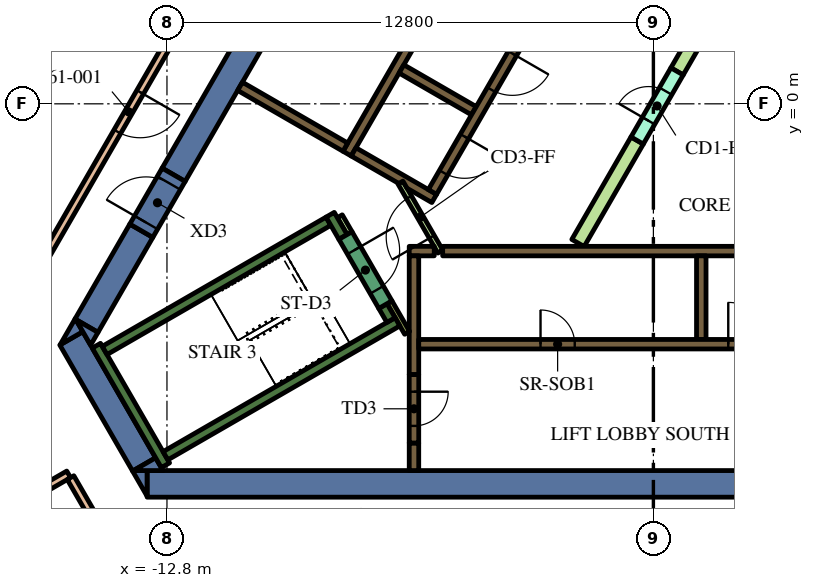
"""IFC4 building model, lengths in metres.
Left out: names, types, materials, properties, quantities, classifications, styles, units other than length and angle.
Written with IfcOpenShell. Run it as: python <this file> out.ifc"""

import sys

from ifc_helpers import new_model, si_unit, direction, frame, frame_2d, origin, place, context, subcontext, project, spatial, polyline, rectangle, outline, extrude, element, fill, save


model = new_model("IFC4")
c1 = context("Model", 3, precision=1e-05, world=origin(), true_north=direction((0.0, 1.0)))
c2 = subcontext(c1, "Body", "Model", "MODEL_VIEW")
j1 = project(units=[si_unit("LENGTHUNIT", "METRE"), si_unit("PLANEANGLEUNIT", "RADIAN")], contexts=[c1])
p1 = place(None, origin())
s1 = spatial("IfcSite", under=j1, at=p1, CompositionType="ELEMENT")
p2 = place(p1, origin())
s2 = spatial("IfcBuilding", under=s1, at=p2, CompositionType="ELEMENT")
p3 = place(p2, frame((0.0, 0.0, 261.6)))
s3 = spatial("IfcBuildingStorey", under=s2, at=p3, CompositionType="ELEMENT", Elevation=261.6)
p4 = place(p3, frame((8.904, -10.0, 0.0), z_axis=(0.0, 0.0, 1.0), x_axis=(-1.0, 0.0, 0.0)))
e1 = element("IfcWall", 1, at=p4, inside=s3, PredefinedType="SOLIDWALL", context=c2, shape_type="SweptSolid", body=[
    extrude(rectangle(XDim=22.226, YDim=0.7, at=frame_2d((11.113, 0.0))), origin(), (0.0, 0.0, 1.0), 5.4),
])
p5 = place(p3, origin())
e2 = element("IfcWall", 2, at=p5, inside=s3, PredefinedType="SOLIDWALL", context=c2, shape_type="SweptSolid", body=[
    extrude(outline(polyline([(-13.712, -9.65), (-13.324, -9.65), (-13.324, -10.322), (-13.712, -9.65)])), origin(), (0.0, 0.0, 1.0), 5.4),
])
p6 = place(p3, frame((-13.402, -9.487, 0.0), z_axis=(0.0, 0.0, 1.0), x_axis=(-0.500020498207, 0.866013568815, 0.0)))
e3 = element("IfcWall", 3, at=p6, inside=s3, PredefinedType="SOLIDWALL", context=c2, shape_type="SweptSolid", body=[
    extrude(rectangle(XDim=3.829, YDim=0.7, at=frame_2d((1.915, 0.0))), origin(), (0.0, 0.0, 1.0), 5.4),
])
e4 = element("IfcWall", 4, at=p5, inside=s3, PredefinedType="SOLIDWALL", context=c2, shape_type="SweptSolid", body=[
    extrude(outline(polyline([(-15.014, -5.995), (-15.611, -6.339), (-15.213, -5.65), (-15.014, -5.995)])), origin(), (0.0, 0.0, 1.0), 5.4),
])
e5 = element("IfcWall", 5, at=p5, inside=s3, PredefinedType="SOLIDWALL", context=c2, shape_type="SweptSolid", body=[
    extrude(outline(polyline([(-12.904, -9.65), (-13.68, -9.65), (-13.098, -9.314), (-12.904, -9.65)])), origin(), (0.0, 0.0, 1.0), 5.4),
])
p7 = place(p3, frame((-13.475, -3.339, 0.0), z_axis=(0.0, 0.0, 1.0), x_axis=(-0.500008214683, -0.866020660983, 0.0)))
e6 = element("IfcWall", 6, at=p7, inside=s3, PredefinedType="SOLIDWALL", context=c2, shape_type="SweptSolid", body=[
    extrude(rectangle(XDim=2.884, YDim=0.7, at=frame_2d((1.442, 0.0))), origin(), (0.0, 0.0, 1.0), 5.4),
])
e7 = element("IfcWall", 7, at=p5, inside=s3, PredefinedType="SOLIDWALL", context=c2, shape_type="SweptSolid", body=[
    extrude(outline(polyline([(-14.809, -6.35), (-15.197, -5.678), (-14.615, -6.014), (-14.809, -6.35)])), origin(), (0.0, 0.0, 1.0), 5.4),
])
p8 = place(p3, frame((-12.625, -1.867, 0.0), z_axis=(0.0, 0.0, 1.0), x_axis=(0.499996974394, 0.866027150612, 0.0)))
e8 = element("IfcWall", 8, at=p8, inside=s3, PredefinedType="SOLIDWALL", context=c2, shape_type="SweptSolid", body=[
    extrude(rectangle(XDim=15.858, YDim=0.7, at=frame_2d((7.929, 0.0))), origin(), (0.0, 0.0, 1.0), 5.4),
])
p9 = place(p3, frame((-12.84, -9.511, 0.0), z_axis=(0.0, 0.0, 1.0), x_axis=(-0.499997733992, 0.866026712061, 0.0)))
e9 = element("IfcWall", 9, at=p9, inside=s3, PredefinedType="SOLIDWALL", context=c2, shape_type="SweptSolid", body=[
    extrude(rectangle(XDim=3.634, YDim=0.25, at=frame_2d((1.817, 0.0))), origin(), (0.0, 0.0, 1.0), 5.4),
])
p10 = place(p3, frame((-14.44, -6.49, 0.0), z_axis=(0.0, 0.0, 1.0), x_axis=(0.866022966069, 0.500004222222, 0.0)))
e10 = element("IfcWall", 10, at=p10, inside=s3, PredefinedType="SOLIDWALL", context=c2, shape_type="SweptSolid", body=[
    extrude(rectangle(XDim=6.8, YDim=0.25, at=frame_2d((3.4, 0.0))), origin(), (0.0, 0.0, 1.0), 5.4),
])
p11 = place(p3, frame((-8.168, -3.503, 0.0), z_axis=(0.0, 0.0, 1.0), x_axis=(-0.499952099219, 0.866053057547, 0.0)))
e11 = element("IfcWall", 11, at=p11, inside=s3, PredefinedType="SOLIDWALL", context=c2, shape_type="SweptSolid", body=[
    extrude(rectangle(XDim=0.675, YDim=0.25, at=frame_2d((0.337, 0.0))), origin(), (0.0, 0.0, 1.0), 5.4),
])
p12 = place(p3, frame((-12.84, -9.261, 0.0), z_axis=(0.0, 0.0, 1.0), x_axis=(0.866016039709, 0.500016218704, 0.0)))
e12 = element("IfcWall", 12, at=p12, inside=s3, PredefinedType="SOLIDWALL", context=c2, shape_type="SweptSolid", body=[
    extrude(rectangle(XDim=7.05, YDim=0.25, at=frame_2d((3.525, 0.0))), origin(), (0.0, 0.0, 1.0), 5.4),
])
p13 = place(p3, frame((-6.905, -5.69, 0.0), z_axis=(0.0, 0.0, 1.0), x_axis=(-0.500402024738, 0.865793170242, 0.0)))
e13 = element("IfcWall", 13, at=p13, inside=s3, PredefinedType="SOLIDWALL", context=c2, shape_type="SweptSolid", body=[
    extrude(rectangle(XDim=0.425, YDim=0.25, at=frame_2d((0.212, 0.0))), origin(), (0.0, 0.0, 1.0), 5.4),
])
p14 = place(p3, frame((-5.545, -3.875, 0.0), z_axis=(0.0, 0.0, 1.0), x_axis=(1.0, 0.0, 0.0)))
e14 = element("IfcWall", 14, at=p14, inside=s3, PredefinedType="SOLIDWALL", context=c2, shape_type="SweptSolid", body=[
    extrude(rectangle(XDim=11.97, YDim=0.25, at=frame_2d((5.985, 0.0))), origin(), (0.0, 0.0, 1.0), 5.4),
])
p15 = place(p3, frame((-6.425, -3.875, 0.0), z_axis=(0.0, 0.0, 1.0), x_axis=(1.0, 0.0, 0.0)))
e15 = element("IfcWall", 15, at=p15, inside=s3, PredefinedType="SOLIDWALL", context=c2, shape_type="SweptSolid", body=[
    extrude(rectangle(XDim=0.658, YDim=0.25, at=frame_2d((0.329, 0.0))), origin(), (0.0, 0.0, 1.0), 5.4),
])
p16 = place(p3, frame((1.26, -4.0, 0.0), z_axis=(0.0, 0.0, 1.0), x_axis=(0.0, -1.0, 0.0)))
e16 = element("IfcWall", 16, at=p16, inside=s3, PredefinedType="SOLIDWALL", context=c2, shape_type="SweptSolid", body=[
    extrude(rectangle(XDim=2.2, YDim=0.25, at=frame_2d((1.1, 0.0))), origin(), (0.0, 0.0, 1.0), 5.4),
])
p17 = place(p3, frame((-6.3, -7.125, 0.0), z_axis=(0.0, 0.0, 1.0), x_axis=(0.0, 1.0, 0.0)))
e17 = element("IfcWall", 17, at=p17, inside=s3, PredefinedType="SOLIDWALL", context=c2, shape_type="SweptSolid", body=[
    extrude(rectangle(XDim=3.125, YDim=0.25, at=frame_2d((1.562, 0.0))), origin(), (0.0, 0.0, 1.0), 5.4),
])
p18 = place(p3, frame((-6.3, -8.925, 0.0), z_axis=(0.0, 0.0, 1.0), x_axis=(0.0, -1.0, 0.0)))
e18 = element("IfcWall", 18, at=p18, inside=s3, PredefinedType="SOLIDWALL", context=c2, shape_type="SweptSolid", body=[
    extrude(rectangle(XDim=0.725, YDim=0.25, at=frame_2d((0.363, 0.0))), origin(), (0.0, 0.0, 1.0), 5.4),
])
p19 = place(p3, frame((6.568, -3.627, 0.0), z_axis=(0.0, 0.0, 1.0), x_axis=(-0.499999455981, 0.866025717874, 0.0)))
e19 = element("IfcWall", 19, at=p19, inside=s3, PredefinedType="SOLIDWALL", context=c2, shape_type="SweptSolid", body=[
    extrude(rectangle(XDim=11.978, YDim=0.25, at=frame_2d((5.989, 0.0))), origin(), (0.0, 0.0, 1.0), 5.4),
])
p20 = place(p3, frame((-8.06, -1.311, 0.0), z_axis=(0.0, 0.0, 1.0), x_axis=(0.50000273126, 0.866023826885, 0.0)))
e20 = element("IfcWall", 20, at=p20, inside=s3, PredefinedType="SOLIDWALL", context=c2, shape_type="SweptSolid", body=[
    extrude(rectangle(XDim=10.33, YDim=0.25, at=frame_2d((5.165, 0.0))), origin(), (0.0, 0.0, 1.0), 5.4),
])
p21 = place(p3, frame((-4.724, -0.182, 0.0), z_axis=(0.0, 0.0, 1.0), x_axis=(-0.866008176907, 0.50002983664, 0.0)))
e21 = element("IfcWall", 21, at=p21, inside=s3, PredefinedType="SOLIDWALL", context=c2, shape_type="SweptSolid", body=[
    extrude(rectangle(XDim=2.2, YDim=0.25, at=frame_2d((1.1, 0.0))), origin(), (0.0, 0.0, 1.0), 5.4),
])
e22 = element("IfcWall", 22, at=p5, inside=s3, PredefinedType="SOLIDWALL", context=c2, shape_type="SweptSolid", body=[
    extrude(outline(polyline([(-5.922, -2.257), (-5.922, -2.257), (-5.705, -2.382), (-5.83, -2.598), (-6.483, -2.221), (-6.591, -2.033), (-6.591, -2.033), (-6.7, -2.096), (-7.952, -1.373), (-7.827, -1.156), (-5.922, -2.257)])), origin(), (0.0, 0.0, 1.0), 5.4),
])
p22 = place(p3, frame((-8.106, -1.14, 0.0), z_axis=(0.0, 0.0, 1.0), x_axis=(-0.866008981251, 0.500028443584, 0.0)))
e23 = element("IfcWall", 23, at=p22, inside=s3, PredefinedType="SOLIDWALL", context=c2, shape_type="SweptSolid", body=[
    extrude(rectangle(XDim=3.2, YDim=0.25, at=frame_2d((1.6, 0.0))), origin(), (0.0, 0.0, 1.0), 5.4),
])
p23 = place(p3, frame((-8.252, -2.958, 0.0), z_axis=(0.0, 0.0, 1.0), x_axis=(0.500174715838, -0.865924508047, 0.0)))
e24 = element("IfcWall", 24, at=p23, inside=s3, PredefinedType="PARTITIONING", context=c2, shape_type="SweptSolid", body=[
    extrude(rectangle(XDim=0.514, YDim=0.15, at=frame_2d((0.257, 0.0))), origin(), (0.0, 0.0, 1.0), 4.75),
])
p24 = place(p3, frame((-6.48, -6.027, 0.0), z_axis=(0.0, 0.0, 1.0), x_axis=(-0.499927229454, 0.866067413802, 0.0)))
e25 = element("IfcWall", 25, at=p24, inside=s3, PredefinedType="PARTITIONING", context=c2, shape_type="SweptSolid", body=[
    extrude(rectangle(XDim=0.929, YDim=0.15, at=frame_2d((0.464, 0.0))), origin(), (0.0, 0.0, 1.0), 5.4),
])
e26 = element("IfcWall", 26, at=p5, inside=s3, PredefinedType="PARTITIONING", context=c2, shape_type="SweptSolid", body=[
    extrude(outline(polyline([(2.017, 3.643), (2.342, 3.456), (0.785, 0.76), (0.46, 0.947), (2.017, 3.643)])), origin(), (0.0, 0.0, 1.0), 4.75),
])
e27 = element("IfcWall", 27, at=p5, inside=s3, PredefinedType="PARTITIONING", context=c2, shape_type="SweptSolid", body=[
    extrude(outline(polyline([(-0.59, -0.872), (-0.265, -1.059), (-1.822, -3.756), (-2.147, -3.568), (-0.59, -0.872)])), origin(), (0.0, 0.0, 1.0), 4.75),
])
p25 = place(p3, frame((-6.175, -6.325, 0.0), z_axis=(0.0, 0.0, 1.0), x_axis=(1.0, 0.0, 0.0)))
e28 = element("IfcWall", 28, at=p25, inside=s3, PredefinedType="SOLIDWALL", context=c2, shape_type="SweptSolid", body=[
    extrude(rectangle(XDim=12.35, YDim=0.25, at=frame_2d((6.175, 0.0))), origin(), (0.0, 0.0, 1.0), 5.4),
])
p26 = place(p25, frame((3.205, 0.0, 0.0)))
e29 = element("IfcOpeningElement", 29, at=p26, cuts=e28, PredefinedType="OPENING", context=c2, shape_type="SweptSolid", body=[
    extrude(rectangle(XDim=0.9, YDim=2.1, at=frame_2d((0.45, 1.05))), frame((0.0, 0.135, 0.0), z_axis=(0.0, -1.0, 0.0), x_axis=(1.0, 0.0, 0.0)), (0.0, 0.0, 1.0), 0.27),
])
p27 = place(p25, frame((8.145, 0.0, 0.0)))
e30 = element("IfcOpeningElement", 30, at=p27, cuts=e28, PredefinedType="OPENING", context=c2, shape_type="SweptSolid", body=[
    extrude(rectangle(XDim=1.1, YDim=2.1, at=frame_2d((0.55, 1.05))), frame((0.0, 0.135, 0.0), z_axis=(0.0, -1.0, 0.0), x_axis=(1.0, 0.0, 0.0)), (0.0, 0.0, 1.0), 0.27),
])
p28 = place(p25, frame((10.665, 0.0, 0.0)))
e31 = element("IfcOpeningElement", 31, at=p28, cuts=e28, PredefinedType="OPENING", context=c2, shape_type="SweptSolid", body=[
    extrude(rectangle(XDim=1.1, YDim=2.1, at=frame_2d((0.55, 1.05))), frame((0.0, 0.135, 0.0), z_axis=(0.0, -1.0, 0.0), x_axis=(1.0, 0.0, 0.0)), (0.0, 0.0, 1.0), 0.27),
])
p29 = place(p3, frame((-0.898, 6.194, 0.0), z_axis=(0.0, 0.0, 1.0), x_axis=(-0.499996202215, -0.866027596426, 0.0)))
e32 = element("IfcWall", 32, at=p29, inside=s3, PredefinedType="SOLIDWALL", context=c2, shape_type="SweptSolid", body=[
    extrude(rectangle(XDim=9.83, YDim=0.25, at=frame_2d((4.915, 0.0))), origin(), (0.0, 0.0, 1.0), 5.4),
])
p30 = place(p29, frame((0.585, 0.0, 0.0)))
e33 = element("IfcOpeningElement", 33, at=p30, cuts=e32, PredefinedType="OPENING", context=c2, shape_type="SweptSolid", body=[
    extrude(rectangle(XDim=1.1, YDim=2.1, at=frame_2d((0.55, 1.05))), frame((0.0, 0.135, 0.0), z_axis=(0.0, -1.0, 0.0), x_axis=(1.0, 0.0, 0.0)), (0.0, 0.0, 1.0), 0.27),
])
p31 = place(p29, frame((3.105, 0.0, 0.0)))
e34 = element("IfcOpeningElement", 34, at=p31, cuts=e32, PredefinedType="OPENING", context=c2, shape_type="SweptSolid", body=[
    extrude(rectangle(XDim=1.1, YDim=2.1, at=frame_2d((0.55, 1.05))), frame((0.0, 0.135, 0.0), z_axis=(0.0, -1.0, 0.0), x_axis=(1.0, 0.0, 0.0)), (0.0, 0.0, 1.0), 0.27),
])
p32 = place(p29, frame((5.625, 0.0, 0.0)))
e35 = element("IfcOpeningElement", 35, at=p32, cuts=e32, PredefinedType="OPENING", context=c2, shape_type="SweptSolid", body=[
    extrude(rectangle(XDim=1.1, YDim=2.1, at=frame_2d((0.55, 1.05))), frame((0.0, 0.135, 0.0), z_axis=(0.0, -1.0, 0.0), x_axis=(1.0, 0.0, 0.0)), (0.0, 0.0, 1.0), 0.27),
])
p33 = place(p29, frame((8.145, 0.0, 0.0)))
e36 = element("IfcOpeningElement", 36, at=p33, cuts=e32, PredefinedType="OPENING", context=c2, shape_type="SweptSolid", body=[
    extrude(rectangle(XDim=1.1, YDim=2.1, at=frame_2d((0.55, 1.05))), frame((0.0, 0.135, 0.0), z_axis=(0.0, -1.0, 0.0), x_axis=(1.0, 0.0, 0.0)), (0.0, 0.0, 1.0), 0.27),
])
p34 = place(p3, frame((-8.103, -3.466, 0.0), z_axis=(0.0, 0.0, 1.0), x_axis=(0.500078061341, -0.865980330357, 0.0)))
e37 = element("IfcWall", 37, at=p34, inside=s3, PredefinedType="SOLIDWALL", context=c2, shape_type="SweptSolid", body=[
    extrude(rectangle(XDim=2.1, YDim=0.4, at=frame_2d((1.05, 0.0))), origin(), (0.0, 0.0, 1.0), 5.4),
])
p35 = place(p34, frame((0.45, 0.0, 0.0)))
e38 = element("IfcOpeningElement", 38, at=p35, cuts=e37, PredefinedType="OPENING", context=c2, shape_type="SweptSolid", body=[
    extrude(rectangle(XDim=1.2, YDim=2.1, at=frame_2d((0.6, 1.05))), frame((0.0, 0.21, 0.0), z_axis=(0.0, -1.0, 0.0), x_axis=(1.0, 0.0, 0.0)), (0.0, 0.0, 1.0), 0.42),
])
p36 = place(p3, frame((-6.3, -7.125, 0.0), z_axis=(0.0, 0.0, 1.0), x_axis=(0.0, -1.0, 0.0)))
e39 = element("IfcWall", 39, at=p36, inside=s3, PredefinedType="SOLIDWALL", context=c2, shape_type="SweptSolid", body=[
    extrude(rectangle(XDim=1.8, YDim=0.25, at=frame_2d((0.9, 0.0))), origin(), (0.0, 0.0, 1.0), 5.4),
])
p37 = place(p36, frame((0.45, 0.0, 0.0)))
e40 = element("IfcOpeningElement", 40, at=p37, cuts=e39, PredefinedType="OPENING", context=c2, shape_type="SweptSolid", body=[
    extrude(rectangle(XDim=0.9, YDim=2.1, at=frame_2d((0.45, 1.05))), frame((0.0, 0.135, 0.0), z_axis=(0.0, -1.0, 0.0), x_axis=(1.0, 0.0, 0.0)), (0.0, 0.0, 1.0), 0.27),
])
p38 = place(p3, frame((-0.427, -0.966, 0.0), z_axis=(0.0, 0.0, 1.0), x_axis=(0.49994051562, 0.866059744384, 0.0)))
e41 = element("IfcWall", 41, at=p38, inside=s3, PredefinedType="PARTITIONING", context=c2, shape_type="SweptSolid", body=[
    extrude(rectangle(XDim=2.1, YDim=0.375, at=frame_2d((1.05, 0.0))), origin(), (0.0, 0.0, 1.0), 4.75),
])
p39 = place(p38, frame((0.6, 0.0, 0.0)))
e42 = element("IfcOpeningElement", 42, at=p39, cuts=e41, PredefinedType="OPENING", context=c2, shape_type="SweptSolid", body=[
    extrude(rectangle(XDim=0.9, YDim=2.1, at=frame_2d((0.45, 1.05))), frame((0.0, 0.198, 0.0), z_axis=(0.0, -1.0, 0.0), x_axis=(1.0, 0.0, 0.0)), (0.0, 0.0, 1.0), 0.395),
])
p40 = place(p3, frame((-5.606, -3.89, 0.0), z_axis=(0.0, 0.0, 1.0), x_axis=(-0.500027713859, 0.866009402589, 0.0)))
e43 = element("IfcWall", 43, at=p40, inside=s3, PredefinedType="PARTITIONING", context=c2, shape_type="SweptSolid", body=[
    extrude(rectangle(XDim=2.1, YDim=0.15, at=frame_2d((1.05, 0.0))), origin(), (0.0, 0.0, 1.0), 4.75),
])
p41 = place(p40, frame((0.45, 0.0, 0.0)))
e44 = element("IfcOpeningElement", 44, at=p41, cuts=e43, PredefinedType="OPENING", context=c2, shape_type="SweptSolid", body=[
    extrude(rectangle(XDim=1.2, YDim=2.1, at=frame_2d((0.6, 1.05))), frame((0.0, 0.085, 0.0), z_axis=(0.0, -1.0, 0.0), x_axis=(1.0, 0.0, 0.0)), (0.0, 0.0, 1.0), 0.17),
])
p42 = place(p3, frame((-13.475, -3.339, 0.0), z_axis=(0.0, 0.0, 1.0), x_axis=(0.499954529098, 0.86605165483, 0.0)))
e45 = element("IfcWall", 45, at=p42, inside=s3, PredefinedType="SOLIDWALL", context=c2, shape_type="SweptSolid", body=[
    extrude(rectangle(XDim=1.7, YDim=0.7, at=frame_2d((0.85, 0.0))), origin(), (0.0, 0.0, 1.0), 5.4),
])
p43 = place(p42, frame((0.25, 0.0, 0.0)))
e46 = element("IfcOpeningElement", 46, at=p43, cuts=e45, PredefinedType="OPENING", context=c2, shape_type="SweptSolid", body=[
    extrude(rectangle(XDim=1.2, YDim=2.1, at=frame_2d((0.6, 1.05))), frame((0.0, 0.36, 0.0), z_axis=(0.0, -1.0, 0.0), x_axis=(1.0, 0.0, 0.0)), (0.0, 0.0, 1.0), 0.72),
])
p44 = place(p3, frame((-10.262, 5.925, 0.0), z_axis=(0.0, 0.0, 1.0), x_axis=(-0.499997784101, -0.866026683131, 0.0)))
e47 = element("IfcWall", 47, at=p44, inside=s3, PredefinedType="PARTITIONING", context=c2, shape_type="SweptSolid", body=[
    extrude(rectangle(XDim=14.174, YDim=0.2, at=frame_2d((7.087, 0.0))), origin(), (0.0, 0.0, 1.0), 4.75),
])
p45 = place(p44, frame((6.487, 0.0, 0.0)))
e48 = element("IfcOpeningElement", 48, at=p45, cuts=e47, PredefinedType="OPENING", context=c2, shape_type="SweptSolid", body=[
    extrude(rectangle(XDim=1.2, YDim=2.1, at=frame_2d((0.6, 1.05))), frame((0.0, 0.11, 0.0), z_axis=(0.0, -1.0, 0.0), x_axis=(1.0, 0.0, 0.0)), (0.0, 0.0, 1.0), 0.22),
])
p46 = place(p3, frame((-15.387, -9.75, 0.0), z_axis=(0.0, 0.0, 1.0), x_axis=(-0.866024483152, -0.500001594578, 0.0)))
e49 = element("IfcWall", 49, at=p46, inside=s3, PredefinedType="PARTITIONING", context=c2, shape_type="SweptSolid", body=[
    extrude(rectangle(XDim=5.35, YDim=0.2, at=frame_2d((2.675, 0.0))), origin(), (0.0, 0.0, 1.0), 4.75),
])
p47 = place(p3, frame((-14.219, -11.772, 0.0), z_axis=(0.0, 0.0, 1.0), x_axis=(-0.499968249168, 0.86604373436, 0.0)))
e50 = element("IfcWall", 50, at=p47, inside=s3, PredefinedType="PARTITIONING", context=c2, shape_type="SweptSolid", body=[
    extrude(rectangle(XDim=2.236, YDim=0.2, at=frame_2d((1.118, 0.0))), origin(), (0.0, 0.0, 1.0), 4.75),
])
p48 = place(p26, origin())
e51 = element("IfcDoor", 51, at=p48, inside=s3, OperationType="SINGLE_SWING_LEFT", PredefinedType="DOOR", context=c2, shape_type="SweptSolid", body=[
    extrude(rectangle(XDim=0.9, YDim=2.1, at=frame_2d((0.45, 1.05))), frame((0.0, 0.025, 0.0), z_axis=(0.0, -1.0, 0.0), x_axis=(1.0, 0.0, 0.0)), (0.0, 0.0, 1.0), 0.05),
])
fill(e29, e51)
p49 = place(p27, origin())
e52 = element("IfcDoor", 52, at=p49, inside=s3, OperationType="DOUBLE_DOOR_SLIDING", PredefinedType="DOOR", context=c2, shape_type="SweptSolid", body=[
    extrude(rectangle(XDim=1.1, YDim=2.1, at=frame_2d((0.55, 1.05))), frame((0.0, 0.025, 0.0), z_axis=(0.0, -1.0, 0.0), x_axis=(1.0, 0.0, 0.0)), (0.0, 0.0, 1.0), 0.05),
])
fill(e30, e52)
p50 = place(p32, origin())
e53 = element("IfcDoor", 53, at=p50, inside=s3, OperationType="DOUBLE_DOOR_SLIDING", PredefinedType="DOOR", context=c2, shape_type="SweptSolid", body=[
    extrude(rectangle(XDim=1.1, YDim=2.1, at=frame_2d((0.55, 1.05))), frame((0.0, 0.025, 0.0), z_axis=(0.0, -1.0, 0.0), x_axis=(1.0, 0.0, 0.0)), (0.0, 0.0, 1.0), 0.05),
])
fill(e35, e53)
p51 = place(p33, origin())
e54 = element("IfcDoor", 54, at=p51, inside=s3, OperationType="DOUBLE_DOOR_SLIDING", PredefinedType="DOOR", context=c2, shape_type="SweptSolid", body=[
    extrude(rectangle(XDim=1.1, YDim=2.1, at=frame_2d((0.55, 1.05))), frame((0.0, 0.025, 0.0), z_axis=(0.0, -1.0, 0.0), x_axis=(1.0, 0.0, 0.0)), (0.0, 0.0, 1.0), 0.05),
])
fill(e36, e54)
p52 = place(p35, origin())
e55 = element("IfcDoor", 55, at=p52, inside=s3, OperationType="SINGLE_SWING_LEFT", PredefinedType="DOOR", context=c2, shape_type="SweptSolid", body=[
    extrude(rectangle(XDim=1.2, YDim=2.1, at=frame_2d((0.6, 1.05))), frame((0.0, 0.025, 0.0), z_axis=(0.0, -1.0, 0.0), x_axis=(1.0, 0.0, 0.0)), (0.0, 0.0, 1.0), 0.05),
])
fill(e38, e55)
p53 = place(p37, origin())
e56 = element("IfcDoor", 56, at=p53, inside=s3, OperationType="SINGLE_SWING_LEFT", PredefinedType="DOOR", context=c2, shape_type="SweptSolid", body=[
    extrude(rectangle(XDim=0.9, YDim=2.1, at=frame_2d((0.45, 1.05))), frame((0.0, 0.025, 0.0), z_axis=(0.0, -1.0, 0.0), x_axis=(1.0, 0.0, 0.0)), (0.0, 0.0, 1.0), 0.05),
])
fill(e40, e56)
p54 = place(p39, origin())
e57 = element("IfcDoor", 57, at=p54, inside=s3, OperationType="SINGLE_SWING_LEFT", PredefinedType="DOOR", context=c2, shape_type="SweptSolid", body=[
    extrude(rectangle(XDim=0.9, YDim=2.1, at=frame_2d((0.45, 1.05))), frame((0.0, 0.025, 0.0), z_axis=(0.0, -1.0, 0.0), x_axis=(1.0, 0.0, 0.0)), (0.0, 0.0, 1.0), 0.05),
])
fill(e42, e57)
p55 = place(p41, origin())
e58 = element("IfcDoor", 58, at=p55, inside=s3, OperationType="SINGLE_SWING_LEFT", PredefinedType="DOOR", context=c2, shape_type="SweptSolid", body=[
    extrude(rectangle(XDim=1.2, YDim=2.1, at=frame_2d((0.6, 1.05))), frame((0.0, 0.025, 0.0), z_axis=(0.0, -1.0, 0.0), x_axis=(1.0, 0.0, 0.0)), (0.0, 0.0, 1.0), 0.05),
])
fill(e44, e58)
p56 = place(p43, origin())
e59 = element("IfcDoor", 59, at=p56, inside=s3, OperationType="SINGLE_SWING_LEFT", PredefinedType="DOOR", context=c2, shape_type="SweptSolid", body=[
    extrude(rectangle(XDim=1.2, YDim=2.1, at=frame_2d((0.6, 1.05))), frame((0.0, 0.025, 0.0), z_axis=(0.0, -1.0, 0.0), x_axis=(1.0, 0.0, 0.0)), (0.0, 0.0, 1.0), 0.05),
])
fill(e46, e59)
p57 = place(p45, origin())
e60 = element("IfcDoor", 60, at=p57, inside=s3, OperationType="SINGLE_SWING_RIGHT", PredefinedType="DOOR", context=c2, shape_type="SweptSolid", body=[
    extrude(rectangle(XDim=1.2, YDim=2.1, at=frame_2d((0.6, 1.05))), frame((0.0, 0.025, 0.0), z_axis=(0.0, -1.0, 0.0), x_axis=(1.0, 0.0, 0.0)), (0.0, 0.0, 1.0), 0.05),
])
fill(e48, e60)
save(model, sys.argv[1])
